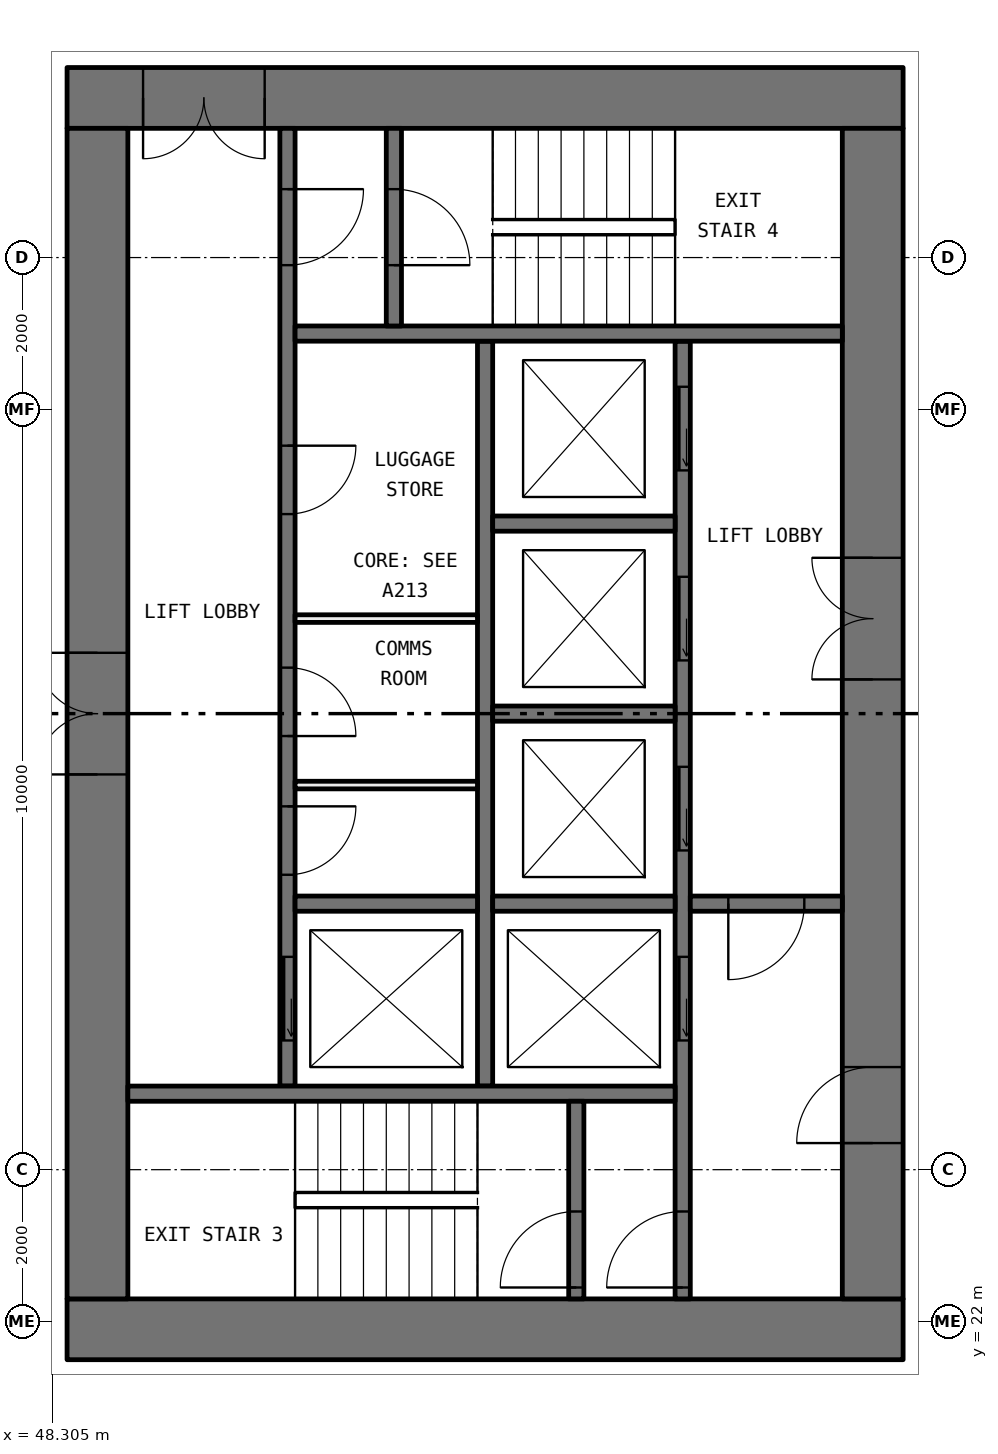
"""IFC4 building model, lengths in metres.
Left out: names, types, materials, properties, quantities, classifications, styles, units other than length and angle.
Written with IfcOpenShell. Run it as: python <this file> out.ifc"""

import sys

from ifc_helpers import new_model, si_unit, direction, frame, frame_2d, origin, place, context, subcontext, project, spatial, rectangle, extrude, element, fill, save


model = new_model("IFC4")
c1 = context("Model", 3, precision=1e-05, world=origin(), true_north=direction((0.0, 1.0)))
c2 = subcontext(c1, "Body", "Model", "MODEL_VIEW")
j1 = project(units=[si_unit("LENGTHUNIT", "METRE"), si_unit("PLANEANGLEUNIT", "RADIAN")], contexts=[c1])
p1 = place(None, origin())
s1 = spatial("IfcSite", under=j1, at=p1, CompositionType="ELEMENT")
p2 = place(p1, origin())
s2 = spatial("IfcBuilding", under=s1, at=p2, CompositionType="ELEMENT")
p3 = place(p2, frame((0.0, 0.0, 54.15)))
s3 = spatial("IfcBuildingStorey", under=s2, at=p3, CompositionType="ELEMENT", Elevation=54.15)
p4 = place(p3, frame((59.5, 21.9, 0.0), z_axis=(0.0, 0.0, 1.0), x_axis=(-1.0, 0.0, 0.0)))
e1 = element("IfcWall", 1, at=p4, inside=s3, PredefinedType="SHEAR", context=c2, shape_type="SweptSolid", body=[
    extrude(rectangle(XDim=11.0, YDim=0.8, at=frame_2d((5.5, 0.0))), origin(), (0.0, 0.0, 1.0), 3.05),
])
p5 = place(p3, frame((59.5, 38.1, 0.0), z_axis=(0.0, 0.0, 1.0), x_axis=(-1.0, 0.0, 0.0)))
e2 = element("IfcWall", 2, at=p5, inside=s3, PredefinedType="SHEAR", context=c2, shape_type="SweptSolid", body=[
    extrude(rectangle(XDim=11.0, YDim=0.8, at=frame_2d((5.5, 0.0))), origin(), (0.0, 0.0, 1.0), 3.05),
])
p6 = place(p5, frame((8.4, 0.0, 0.0)))
e3 = element("IfcOpeningElement", 3, at=p6, cuts=e2, PredefinedType="OPENING", context=c2, shape_type="SweptSolid", body=[
    extrude(rectangle(XDim=1.6, YDim=2.1, at=frame_2d((0.8, 1.05))), frame((0.0, 0.41, 0.0), z_axis=(0.0, -1.0, 0.0), x_axis=(1.0, 0.0, 0.0)), (0.0, 0.0, 1.0), 0.82),
])
p7 = place(p3, frame((59.1, 22.3, 0.0), z_axis=(0.0, 0.0, 1.0), x_axis=(0.0, 1.0, 0.0)))
e4 = element("IfcWall", 4, at=p7, inside=s3, PredefinedType="SHEAR", context=c2, shape_type="SweptSolid", body=[
    extrude(rectangle(XDim=15.4, YDim=0.8, at=frame_2d((7.7, 0.0))), origin(), (0.0, 0.0, 1.0), 3.05),
])
p8 = place(p7, frame((8.15, 0.0, 0.0)))
e5 = element("IfcOpeningElement", 5, at=p8, cuts=e4, PredefinedType="OPENING", context=c2, shape_type="SweptSolid", body=[
    extrude(rectangle(XDim=1.6, YDim=2.1, at=frame_2d((0.8, 1.05))), frame((0.0, 0.41, 0.0), z_axis=(0.0, -1.0, 0.0), x_axis=(1.0, 0.0, 0.0)), (0.0, 0.0, 1.0), 0.82),
])
p9 = place(p7, frame((2.05, 0.0, 0.0)))
e6 = element("IfcOpeningElement", 6, at=p9, cuts=e4, PredefinedType="OPENING", context=c2, shape_type="SweptSolid", body=[
    extrude(rectangle(XDim=1.0, YDim=2.1, at=frame_2d((0.5, 1.05))), frame((0.0, 0.41, 0.0), z_axis=(0.0, -1.0, 0.0), x_axis=(1.0, 0.0, 0.0)), (0.0, 0.0, 1.0), 0.82),
])
p10 = place(p3, frame((48.9, 22.3, 0.0), z_axis=(0.0, 0.0, 1.0), x_axis=(0.0, 1.0, 0.0)))
e7 = element("IfcWall", 7, at=p10, inside=s3, PredefinedType="SHEAR", context=c2, shape_type="SweptSolid", body=[
    extrude(rectangle(XDim=15.4, YDim=0.8, at=frame_2d((7.7, 0.0))), origin(), (0.0, 0.0, 1.0), 3.05),
])
p11 = place(p10, frame((6.9, 0.0, 0.0)))
e8 = element("IfcOpeningElement", 8, at=p11, cuts=e7, PredefinedType="OPENING", context=c2, shape_type="SweptSolid", body=[
    extrude(rectangle(XDim=1.6, YDim=2.1, at=frame_2d((0.8, 1.05))), frame((0.0, 0.41, 0.0), z_axis=(0.0, -1.0, 0.0), x_axis=(1.0, 0.0, 0.0)), (0.0, 0.0, 1.0), 0.82),
])
p12 = place(p3, frame((56.6, 22.3, 0.0), z_axis=(0.0, 0.0, 1.0), x_axis=(0.0, 1.0, 0.0)))
e9 = element("IfcWall", 9, at=p12, inside=s3, PredefinedType="SOLIDWALL", context=c2, shape_type="SweptSolid", body=[
    extrude(rectangle(XDim=12.6, YDim=0.2, at=frame_2d((6.3, 0.0))), origin(), (0.0, 0.0, 1.0), 3.05),
])
p13 = place(p12, frame((3.4, 0.0, 0.0)))
e10 = element("IfcOpeningElement", 10, at=p13, cuts=e9, PredefinedType="OPENING", context=c2, shape_type="SweptSolid", body=[
    extrude(rectangle(XDim=1.1, YDim=2.1, at=frame_2d((0.55, 1.05))), frame((0.0, 0.11, 0.0), z_axis=(0.0, -1.0, 0.0), x_axis=(1.0, 0.0, 0.0)), (0.0, 0.0, 1.0), 0.22),
])
p14 = place(p12, frame((5.9, 0.0, 0.0)))
e11 = element("IfcOpeningElement", 11, at=p14, cuts=e9, PredefinedType="OPENING", context=c2, shape_type="SweptSolid", body=[
    extrude(rectangle(XDim=1.1, YDim=2.1, at=frame_2d((0.55, 1.05))), frame((0.0, 0.11, 0.0), z_axis=(0.0, -1.0, 0.0), x_axis=(1.0, 0.0, 0.0)), (0.0, 0.0, 1.0), 0.22),
])
p15 = place(p12, frame((8.4, 0.0, 0.0)))
e12 = element("IfcOpeningElement", 12, at=p15, cuts=e9, PredefinedType="OPENING", context=c2, shape_type="SweptSolid", body=[
    extrude(rectangle(XDim=1.1, YDim=2.1, at=frame_2d((0.55, 1.05))), frame((0.0, 0.11, 0.0), z_axis=(0.0, -1.0, 0.0), x_axis=(1.0, 0.0, 0.0)), (0.0, 0.0, 1.0), 0.22),
])
p16 = place(p12, frame((10.9, 0.0, 0.0)))
e13 = element("IfcOpeningElement", 13, at=p16, cuts=e9, PredefinedType="OPENING", context=c2, shape_type="SweptSolid", body=[
    extrude(rectangle(XDim=1.1, YDim=2.1, at=frame_2d((0.55, 1.05))), frame((0.0, 0.11, 0.0), z_axis=(0.0, -1.0, 0.0), x_axis=(1.0, 0.0, 0.0)), (0.0, 0.0, 1.0), 0.22),
])
p17 = place(p12, frame((0.15, 0.0, 0.0)))
e14 = element("IfcOpeningElement", 14, at=p17, cuts=e9, PredefinedType="OPENING", context=c2, shape_type="SweptSolid", body=[
    extrude(rectangle(XDim=1.0, YDim=2.1, at=frame_2d((0.5, 1.05))), frame((0.0, 0.11, 0.0), z_axis=(0.0, -1.0, 0.0), x_axis=(1.0, 0.0, 0.0)), (0.0, 0.0, 1.0), 0.22),
])
p18 = place(p3, frame((51.4, 25.1, 0.0), z_axis=(0.0, 0.0, 1.0), x_axis=(0.0, 1.0, 0.0)))
e15 = element("IfcWall", 15, at=p18, inside=s3, PredefinedType="SOLIDWALL", context=c2, shape_type="SweptSolid", body=[
    extrude(rectangle(XDim=12.6, YDim=0.2, at=frame_2d((6.3, 0.0))), origin(), (0.0, 0.0, 1.0), 3.05),
])
p19 = place(p18, frame((0.6, 0.0, 0.0)))
e16 = element("IfcOpeningElement", 16, at=p19, cuts=e15, PredefinedType="OPENING", context=c2, shape_type="SweptSolid", body=[
    extrude(rectangle(XDim=1.1, YDim=2.1, at=frame_2d((0.55, 1.05))), frame((0.0, 0.11, 0.0), z_axis=(0.0, -1.0, 0.0), x_axis=(1.0, 0.0, 0.0)), (0.0, 0.0, 1.0), 0.22),
])
p20 = place(p18, frame((10.8, 0.0, 0.0)))
e17 = element("IfcOpeningElement", 17, at=p20, cuts=e15, PredefinedType="OPENING", context=c2, shape_type="SweptSolid", body=[
    extrude(rectangle(XDim=1.0, YDim=2.1, at=frame_2d((0.5, 1.05))), frame((0.0, 0.11, 0.0), z_axis=(0.0, -1.0, 0.0), x_axis=(1.0, 0.0, 0.0)), (0.0, 0.0, 1.0), 0.22),
])
p21 = place(p18, frame((2.78, 0.0, 0.0)))
e18 = element("IfcOpeningElement", 18, at=p21, cuts=e15, PredefinedType="OPENING", context=c2, shape_type="SweptSolid", body=[
    extrude(rectangle(XDim=0.9, YDim=2.1, at=frame_2d((0.45, 1.05))), frame((0.0, 0.11, 0.0), z_axis=(0.0, -1.0, 0.0), x_axis=(1.0, 0.0, 0.0)), (0.0, 0.0, 1.0), 0.22),
])
p22 = place(p18, frame((4.605, 0.0, 0.0)))
e19 = element("IfcOpeningElement", 19, at=p22, cuts=e15, PredefinedType="OPENING", context=c2, shape_type="SweptSolid", body=[
    extrude(rectangle(XDim=0.9, YDim=2.1, at=frame_2d((0.45, 1.05))), frame((0.0, 0.11, 0.0), z_axis=(0.0, -1.0, 0.0), x_axis=(1.0, 0.0, 0.0)), (0.0, 0.0, 1.0), 0.22),
])
p23 = place(p18, frame((7.525, 0.0, 0.0)))
e20 = element("IfcOpeningElement", 20, at=p23, cuts=e15, PredefinedType="OPENING", context=c2, shape_type="SweptSolid", body=[
    extrude(rectangle(XDim=0.9, YDim=2.1, at=frame_2d((0.45, 1.05))), frame((0.0, 0.11, 0.0), z_axis=(0.0, -1.0, 0.0), x_axis=(1.0, 0.0, 0.0)), (0.0, 0.0, 1.0), 0.22),
])
p24 = place(p3, frame((54.0, 25.1, 0.0), z_axis=(0.0, 0.0, 1.0), x_axis=(0.0, 1.0, 0.0)))
e21 = element("IfcWall", 21, at=p24, inside=s3, PredefinedType="SOLIDWALL", context=c2, shape_type="SweptSolid", body=[
    extrude(rectangle(XDim=9.8, YDim=0.2, at=frame_2d((4.9, 0.0))), origin(), (0.0, 0.0, 1.0), 3.05),
])
for number, where, z_axis, x_axis in (
    (22, (56.5, 25.0, 0.0), (0.0, 0.0, 1.0), (-1.0, 0.0, 0.0)),
    (23, (58.7, 35.0, 0.0), (0.0, 0.0, 1.0), (-1.0, 0.0, 0.0)),
):
    element("IfcWall", number, at=place(p3, frame(where, z_axis=z_axis, x_axis=x_axis)), inside=s3, PredefinedType="SOLIDWALL", context=c2, shape_type="SweptSolid", body=[
        extrude(rectangle(XDim=7.2, YDim=0.2, at=frame_2d((3.6, 0.0))), origin(), (0.0, 0.0, 1.0), 3.05),
    ])
p25 = place(p3, frame((58.7, 27.5, 0.0), z_axis=(0.0, 0.0, 1.0), x_axis=(-1.0, 0.0, 0.0)))
e24 = element("IfcWall", 24, at=p25, inside=s3, PredefinedType="SOLIDWALL", context=c2, shape_type="SweptSolid", body=[
    extrude(rectangle(XDim=2.0, YDim=0.2, at=frame_2d((1.0, 0.0))), origin(), (0.0, 0.0, 1.0), 3.05),
])
p26 = place(p25, frame((0.5, 0.0, 0.0)))
e25 = element("IfcOpeningElement", 25, at=p26, cuts=e24, PredefinedType="OPENING", context=c2, shape_type="SweptSolid", body=[
    extrude(rectangle(XDim=1.0, YDim=2.1, at=frame_2d((0.5, 1.05))), frame((0.0, 0.11, 0.0), z_axis=(0.0, -1.0, 0.0), x_axis=(1.0, 0.0, 0.0)), (0.0, 0.0, 1.0), 0.22),
])
p27 = place(p3, frame((55.2, 22.3, 0.0), z_axis=(0.0, 0.0, 1.0), x_axis=(0.0, 1.0, 0.0)))
e26 = element("IfcWall", 26, at=p27, inside=s3, PredefinedType="SOLIDWALL", context=c2, shape_type="SweptSolid", body=[
    extrude(rectangle(XDim=2.6, YDim=0.2, at=frame_2d((1.3, 0.0))), origin(), (0.0, 0.0, 1.0), 3.05),
])
p28 = place(p27, frame((0.15, 0.0, 0.0)))
e27 = element("IfcOpeningElement", 27, at=p28, cuts=e26, PredefinedType="OPENING", context=c2, shape_type="SweptSolid", body=[
    extrude(rectangle(XDim=1.0, YDim=2.1, at=frame_2d((0.5, 1.05))), frame((0.0, 0.11, 0.0), z_axis=(0.0, -1.0, 0.0), x_axis=(1.0, 0.0, 0.0)), (0.0, 0.0, 1.0), 0.22),
])
p29 = place(p3, frame((52.8, 35.1, 0.0), z_axis=(0.0, 0.0, 1.0), x_axis=(0.0, 1.0, 0.0)))
e28 = element("IfcWall", 28, at=p29, inside=s3, PredefinedType="SOLIDWALL", context=c2, shape_type="SweptSolid", body=[
    extrude(rectangle(XDim=2.6, YDim=0.2, at=frame_2d((1.3, 0.0))), origin(), (0.0, 0.0, 1.0), 3.05),
])
p30 = place(p29, frame((0.8, 0.0, 0.0)))
e29 = element("IfcOpeningElement", 29, at=p30, cuts=e28, PredefinedType="OPENING", context=c2, shape_type="SweptSolid", body=[
    extrude(rectangle(XDim=1.0, YDim=2.1, at=frame_2d((0.5, 1.05))), frame((0.0, 0.11, 0.0), z_axis=(0.0, -1.0, 0.0), x_axis=(1.0, 0.0, 0.0)), (0.0, 0.0, 1.0), 0.22),
])
for number, where, z_axis, x_axis in (
    (30, (56.5, 27.5, 0.0), (0.0, 0.0, 1.0), (-1.0, 0.0, 0.0)),
    (31, (56.5, 30.0, 0.0), (0.0, 0.0, 1.0), (-1.0, 0.0, 0.0)),
    (32, (56.5, 32.5, 0.0), (0.0, 0.0, 1.0), (-1.0, 0.0, 0.0)),
    (33, (53.9, 27.5, 0.0), (0.0, 0.0, 1.0), (-1.0, 0.0, 0.0)),
):
    element("IfcWall", number, at=place(p3, frame(where, z_axis=z_axis, x_axis=x_axis)), inside=s3, PredefinedType="SOLIDWALL", context=c2, shape_type="SweptSolid", body=[
        extrude(rectangle(XDim=2.4, YDim=0.2, at=frame_2d((1.2, 0.0))), origin(), (0.0, 0.0, 1.0), 3.05),
    ])
for number, where, z_axis, x_axis in (
    (34, (53.9, 29.06, 0.0), (0.0, 0.0, 1.0), (-1.0, 0.0, 0.0)),
    (35, (53.9, 31.25, 0.0), (0.0, 0.0, 1.0), (-1.0, 0.0, 0.0)),
):
    element("IfcWall", number, at=place(p3, frame(where, z_axis=z_axis, x_axis=x_axis)), inside=s3, PredefinedType="PARTITIONING", context=c2, shape_type="SweptSolid", body=[
        extrude(rectangle(XDim=2.4, YDim=0.1, at=frame_2d((1.2, 0.0))), origin(), (0.0, 0.0, 1.0), 3.05),
    ])
p31 = place(p19, origin())
e36 = element("IfcDoor", 36, at=p31, inside=s3, OperationType="SLIDING_TO_LEFT", PredefinedType="DOOR", context=c2, shape_type="SweptSolid", body=[
    extrude(rectangle(XDim=1.1, YDim=2.1, at=frame_2d((0.55, 1.05))), frame((0.0, 0.025, 0.0), z_axis=(0.0, -1.0, 0.0), x_axis=(1.0, 0.0, 0.0)), (0.0, 0.0, 1.0), 0.05),
])
fill(e16, e36)
p32 = place(p13, origin())
e37 = element("IfcDoor", 37, at=p32, inside=s3, OperationType="SLIDING_TO_LEFT", PredefinedType="DOOR", context=c2, shape_type="SweptSolid", body=[
    extrude(rectangle(XDim=1.1, YDim=2.1, at=frame_2d((0.55, 1.05))), frame((0.0, 0.025, 0.0), z_axis=(0.0, -1.0, 0.0), x_axis=(1.0, 0.0, 0.0)), (0.0, 0.0, 1.0), 0.05),
])
fill(e10, e37)
p33 = place(p14, origin())
e38 = element("IfcDoor", 38, at=p33, inside=s3, OperationType="SLIDING_TO_LEFT", PredefinedType="DOOR", context=c2, shape_type="SweptSolid", body=[
    extrude(rectangle(XDim=1.1, YDim=2.1, at=frame_2d((0.55, 1.05))), frame((0.0, 0.025, 0.0), z_axis=(0.0, -1.0, 0.0), x_axis=(1.0, 0.0, 0.0)), (0.0, 0.0, 1.0), 0.05),
])
fill(e11, e38)
p34 = place(p15, origin())
e39 = element("IfcDoor", 39, at=p34, inside=s3, OperationType="SLIDING_TO_LEFT", PredefinedType="DOOR", context=c2, shape_type="SweptSolid", body=[
    extrude(rectangle(XDim=1.1, YDim=2.1, at=frame_2d((0.55, 1.05))), frame((0.0, 0.025, 0.0), z_axis=(0.0, -1.0, 0.0), x_axis=(1.0, 0.0, 0.0)), (0.0, 0.0, 1.0), 0.05),
])
fill(e12, e39)
p35 = place(p16, origin())
e40 = element("IfcDoor", 40, at=p35, inside=s3, OperationType="SLIDING_TO_LEFT", PredefinedType="DOOR", context=c2, shape_type="SweptSolid", body=[
    extrude(rectangle(XDim=1.1, YDim=2.1, at=frame_2d((0.55, 1.05))), frame((0.0, 0.025, 0.0), z_axis=(0.0, -1.0, 0.0), x_axis=(1.0, 0.0, 0.0)), (0.0, 0.0, 1.0), 0.05),
])
fill(e13, e40)
p36 = place(p28, origin())
e41 = element("IfcDoor", 41, at=p36, inside=s3, OperationType="SINGLE_SWING_RIGHT", PredefinedType="DOOR", context=c2, shape_type="SweptSolid", body=[
    extrude(rectangle(XDim=1.0, YDim=2.1, at=frame_2d((0.5, 1.05))), frame((0.0, 0.025, 0.0), z_axis=(0.0, -1.0, 0.0), x_axis=(1.0, 0.0, 0.0)), (0.0, 0.0, 1.0), 0.05),
])
fill(e27, e41)
p37 = place(p17, origin())
e42 = element("IfcDoor", 42, at=p37, inside=s3, OperationType="SINGLE_SWING_RIGHT", PredefinedType="DOOR", context=c2, shape_type="SweptSolid", body=[
    extrude(rectangle(XDim=1.0, YDim=2.1, at=frame_2d((0.5, 1.05))), frame((0.0, 0.025, 0.0), z_axis=(0.0, -1.0, 0.0), x_axis=(1.0, 0.0, 0.0)), (0.0, 0.0, 1.0), 0.05),
])
fill(e14, e42)
p38 = place(p20, frame((1.0, 0.0, 0.0), x_axis=(-1.0, 0.0, 0.0)))
e43 = element("IfcDoor", 43, at=p38, inside=s3, OperationType="SINGLE_SWING_RIGHT", PredefinedType="DOOR", context=c2, shape_type="SweptSolid", body=[
    extrude(rectangle(XDim=1.0, YDim=2.1, at=frame_2d((0.5, 1.05))), frame((0.0, 0.025, 0.0), z_axis=(0.0, -1.0, 0.0), x_axis=(1.0, 0.0, 0.0)), (0.0, 0.0, 1.0), 0.05),
])
fill(e17, e43)
p39 = place(p30, frame((1.0, 0.0, 0.0), x_axis=(-1.0, 0.0, 0.0)))
e44 = element("IfcDoor", 44, at=p39, inside=s3, OperationType="SINGLE_SWING_LEFT", PredefinedType="DOOR", context=c2, shape_type="SweptSolid", body=[
    extrude(rectangle(XDim=1.0, YDim=2.1, at=frame_2d((0.5, 1.05))), frame((0.0, 0.025, 0.0), z_axis=(0.0, -1.0, 0.0), x_axis=(1.0, 0.0, 0.0)), (0.0, 0.0, 1.0), 0.05),
])
fill(e29, e44)
p40 = place(p26, origin())
e45 = element("IfcDoor", 45, at=p40, inside=s3, OperationType="SINGLE_SWING_LEFT", PredefinedType="DOOR", context=c2, shape_type="SweptSolid", body=[
    extrude(rectangle(XDim=1.0, YDim=2.1, at=frame_2d((0.5, 1.05))), frame((0.0, 0.025, 0.0), z_axis=(0.0, -1.0, 0.0), x_axis=(1.0, 0.0, 0.0)), (0.0, 0.0, 1.0), 0.05),
])
fill(e25, e45)
p41 = place(p8, origin())
e46 = element("IfcDoor", 46, at=p41, inside=s3, OperationType="DOUBLE_DOOR_SINGLE_SWING", PredefinedType="DOOR", context=c2, shape_type="SweptSolid", body=[
    extrude(rectangle(XDim=1.6, YDim=2.1, at=frame_2d((0.8, 1.05))), frame((0.0, 0.025, 0.0), z_axis=(0.0, -1.0, 0.0), x_axis=(1.0, 0.0, 0.0)), (0.0, 0.0, 1.0), 0.05),
])
fill(e5, e46)
p42 = place(p9, origin())
e47 = element("IfcDoor", 47, at=p42, inside=s3, OperationType="SINGLE_SWING_RIGHT", PredefinedType="DOOR", context=c2, shape_type="SweptSolid", body=[
    extrude(rectangle(XDim=1.0, YDim=2.1, at=frame_2d((0.5, 1.05))), frame((0.0, 0.025, 0.0), z_axis=(0.0, -1.0, 0.0), x_axis=(1.0, 0.0, 0.0)), (0.0, 0.0, 1.0), 0.05),
])
fill(e6, e47)
p43 = place(p6, origin())
e48 = element("IfcDoor", 48, at=p43, inside=s3, OperationType="DOUBLE_DOOR_SINGLE_SWING", PredefinedType="DOOR", context=c2, shape_type="SweptSolid", body=[
    extrude(rectangle(XDim=1.6, YDim=2.1, at=frame_2d((0.8, 1.05))), frame((0.0, 0.025, 0.0), z_axis=(0.0, -1.0, 0.0), x_axis=(1.0, 0.0, 0.0)), (0.0, 0.0, 1.0), 0.05),
])
fill(e3, e48)
p44 = place(p11, origin())
e49 = element("IfcDoor", 49, at=p44, inside=s3, OperationType="DOUBLE_DOOR_SINGLE_SWING", PredefinedType="DOOR", context=c2, shape_type="SweptSolid", body=[
    extrude(rectangle(XDim=1.6, YDim=2.1, at=frame_2d((0.8, 1.05))), frame((0.0, 0.025, 0.0), z_axis=(0.0, -1.0, 0.0), x_axis=(1.0, 0.0, 0.0)), (0.0, 0.0, 1.0), 0.05),
])
fill(e8, e49)
p45 = place(p21, frame((0.9, 0.0, 0.0), x_axis=(-1.0, 0.0, 0.0)))
e50 = element("IfcDoor", 50, at=p45, inside=s3, OperationType="SINGLE_SWING_RIGHT", PredefinedType="DOOR", context=c2, shape_type="SweptSolid", body=[
    extrude(rectangle(XDim=0.9, YDim=2.1, at=frame_2d((0.45, 1.05))), frame((0.0, 0.025, 0.0), z_axis=(0.0, -1.0, 0.0), x_axis=(1.0, 0.0, 0.0)), (0.0, 0.0, 1.0), 0.05),
])
fill(e18, e50)
p46 = place(p22, frame((0.9, 0.0, 0.0), x_axis=(-1.0, 0.0, 0.0)))
e51 = element("IfcDoor", 51, at=p46, inside=s3, OperationType="SINGLE_SWING_LEFT", PredefinedType="DOOR", context=c2, shape_type="SweptSolid", body=[
    extrude(rectangle(XDim=0.9, YDim=2.1, at=frame_2d((0.45, 1.05))), frame((0.0, 0.025, 0.0), z_axis=(0.0, -1.0, 0.0), x_axis=(1.0, 0.0, 0.0)), (0.0, 0.0, 1.0), 0.05),
])
fill(e19, e51)
p47 = place(p23, frame((0.9, 0.0, 0.0), x_axis=(-1.0, 0.0, 0.0)))
e52 = element("IfcDoor", 52, at=p47, inside=s3, OperationType="SINGLE_SWING_RIGHT", PredefinedType="DOOR", context=c2, shape_type="SweptSolid", body=[
    extrude(rectangle(XDim=0.9, YDim=2.1, at=frame_2d((0.45, 1.05))), frame((0.0, 0.025, 0.0), z_axis=(0.0, -1.0, 0.0), x_axis=(1.0, 0.0, 0.0)), (0.0, 0.0, 1.0), 0.05),
])
fill(e20, e52)
save(model, sys.argv[1])
